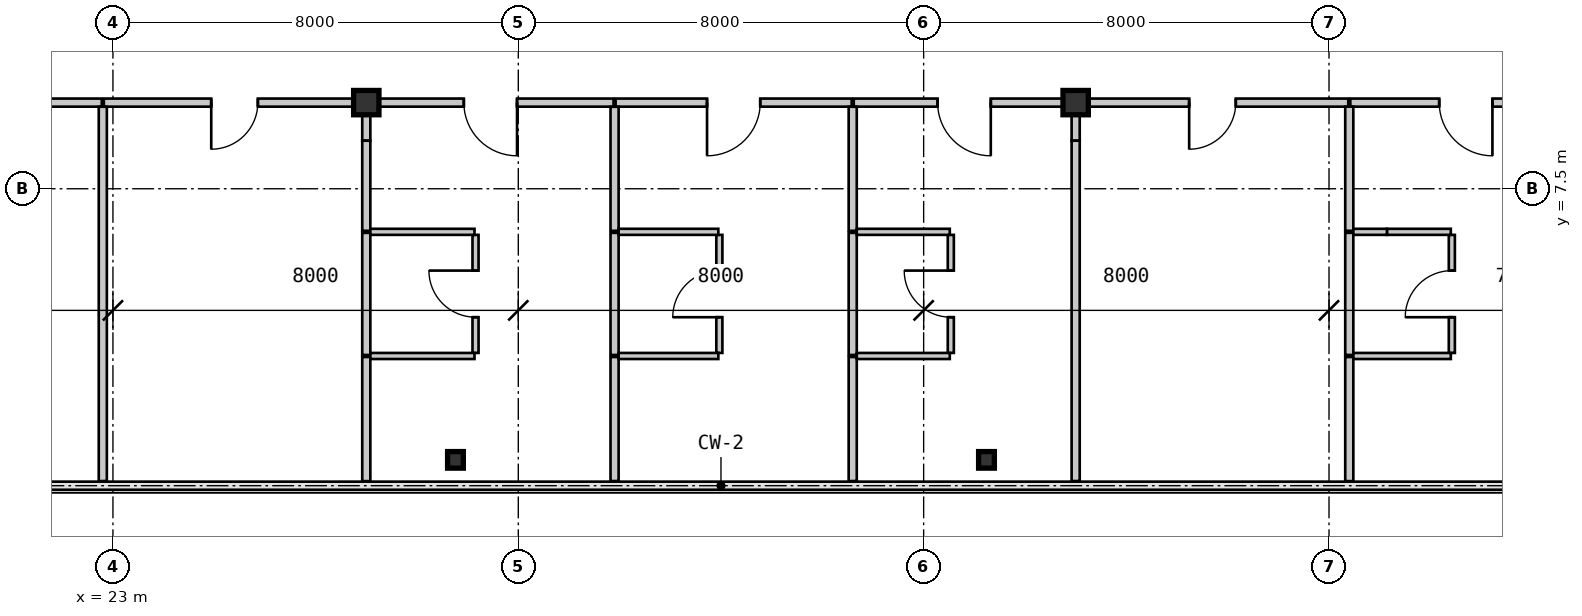
"""IFC4 building model, lengths in metres.
Left out: names, types, materials, properties, quantities, classifications, styles, units other than length and angle.
Written with IfcOpenShell. Run it as: python <this file> out.ifc"""

import sys

from ifc_helpers import new_model, si_unit, direction, frame, frame_2d, origin, origin_2d, place, context, subcontext, project, spatial, rectangle, i_section, extrude, source, transform, mapped, element, fill, save


model = new_model("IFC4")
c1 = context("Model", 3, precision=1e-05, world=origin(), true_north=direction((0.0, 1.0)))
c2 = subcontext(c1, "Body", "Model", "MODEL_VIEW")
j1 = project(units=[si_unit("LENGTHUNIT", "METRE"), si_unit("PLANEANGLEUNIT", "RADIAN")], contexts=[c1])
p1 = place(None, origin())
s1 = spatial("IfcSite", under=j1, at=p1, CompositionType="ELEMENT")
p2 = place(p1, origin())
s2 = spatial("IfcBuilding", under=s1, at=p2, CompositionType="ELEMENT")
p3 = place(p2, frame((0.0, 0.0, 19.95)))
s3 = spatial("IfcBuildingStorey", under=s2, at=p3, CompositionType="ELEMENT", Elevation=19.95)
m1 = source(origin(), c2, "Body", "SweptSolid", [
    extrude(i_section(OverallWidth=0.5, OverallDepth=0.48, WebThickness=0.028, FlangeThickness=0.044, at=origin_2d()), origin(), (0.0, 0.0, 1.0), 3.15),
])
for number, where, z_axis, x_axis in (
    (1, (28.0, 9.2, 0.0), (0.0, 0.0, 1.0), (1.0, 0.0, 0.0)),
    (2, (42.0, 9.2, 0.0), (0.0, 0.0, 1.0), (1.0, 0.0, 0.0)),
):
    element("IfcColumn", number, at=place(p3, frame(where, z_axis=z_axis, x_axis=x_axis)), inside=s3, PredefinedType="COLUMN", context=c2, shape_type="MappedRepresentation", body=[
        mapped(m1, transform((0.0, 0.0, 0.0), scale=1.0)),
    ])
m2 = source(origin(), c2, "Body", "SweptSolid", [
    extrude(i_section(OverallWidth=0.311, OverallDepth=0.327, WebThickness=0.016, FlangeThickness=0.025, at=origin_2d()), origin(), (0.0, 0.0, 1.0), 3.15),
])
for number, where, z_axis, x_axis in (
    (3, (29.76, 2.15, 0.0), (0.0, 0.0, 1.0), (1.0, 0.0, 0.0)),
    (4, (40.24, 2.15, 0.0), (0.0, 0.0, 1.0), (1.0, 0.0, 0.0)),
):
    element("IfcColumn", number, at=place(p3, frame(where, z_axis=z_axis, x_axis=x_axis)), inside=s3, PredefinedType="COLUMN", context=c2, shape_type="MappedRepresentation", body=[
        mapped(m2, transform((0.0, 0.0, 0.0), scale=1.0)),
    ])
m3 = source(origin(), c2, "Body", "SweptSolid", [
    extrude(rectangle(XDim=4.76, YDim=0.16, at=frame_2d((2.38, 0.0))), origin(), (0.0, 0.0, 1.0), 2.93),
])
p4 = place(p3, frame((22.78, 9.2, 0.0), z_axis=(0.0, 0.0, 1.0), x_axis=(-1.0, 0.0, 0.0)))
e5 = element("IfcWall", 5, at=p4, inside=s3, PredefinedType="PARTITIONING", context=c2, shape_type="MappedRepresentation", body=[
    mapped(m3, transform((0.0, 0.0, 0.0), scale=1.0)),
])
m4 = source(origin(), c2, "Body", "SweptSolid", [
    extrude(rectangle(XDim=1.05, YDim=2.1, at=frame_2d((0.525, 1.05))), frame((0.0, 0.09, 0.0), z_axis=(0.0, -1.0, 0.0), x_axis=(1.0, 0.0, 0.0)), (0.0, 0.0, 1.0), 0.18),
])
p5 = place(p4, frame((1.855, 0.0, 0.0)))
e6 = element("IfcOpeningElement", 6, at=p5, cuts=e5, PredefinedType="OPENING", context=c2, shape_type="MappedRepresentation", body=[
    mapped(m4, transform((0.0, 0.0, 0.0), scale=1.0)),
])
m5 = source(origin(), c2, "Body", "SweptSolid", [
    extrude(rectangle(XDim=5.159, YDim=0.16, at=frame_2d((2.58, 0.0))), origin(), (0.0, 0.0, 1.0), 2.93),
])
p6 = place(p3, frame((27.98, 9.2, 0.0), z_axis=(0.0, 0.0, 1.0), x_axis=(-1.0, 0.0, 0.0)))
e7 = element("IfcWall", 7, at=p6, inside=s3, PredefinedType="PARTITIONING", context=c2, shape_type="MappedRepresentation", body=[
    mapped(m5, transform((0.0, 0.0, 0.0), scale=1.0)),
])
m6 = source(origin(), c2, "Body", "SweptSolid", [
    extrude(rectangle(XDim=0.92, YDim=2.1, at=frame_2d((0.46, 1.05))), frame((0.0, 0.09, 0.0), z_axis=(0.0, -1.0, 0.0), x_axis=(1.0, 0.0, 0.0)), (0.0, 0.0, 1.0), 0.18),
])
p7 = place(p6, frame((2.12, 0.0, 0.0)))
e8 = element("IfcOpeningElement", 8, at=p7, cuts=e7, PredefinedType="OPENING", context=c2, shape_type="MappedRepresentation", body=[
    mapped(m6, transform((0.0, 0.0, 0.0), scale=1.0)),
])
m7 = source(origin(), c2, "Body", "SweptSolid", [
    extrude(rectangle(XDim=4.859, YDim=0.16, at=frame_2d((2.43, 0.0))), origin(), (0.0, 0.0, 1.0), 2.328),
])
p8 = place(p3, frame((32.88, 9.2, 0.0), z_axis=(0.0, 0.0, 1.0), x_axis=(-1.0, 0.0, 0.0)))
e9 = element("IfcWall", 9, at=p8, inside=s3, PredefinedType="PARTITIONING", context=c2, shape_type="MappedRepresentation", body=[
    mapped(m7, transform((0.0, 0.0, 0.0), scale=1.0)),
])
p9 = place(p8, frame((1.905, 0.0, 0.0)))
e10 = element("IfcOpeningElement", 10, at=p9, cuts=e9, PredefinedType="OPENING", context=c2, shape_type="MappedRepresentation", body=[
    mapped(m4, transform((0.0, 0.0, 0.0), scale=1.0)),
])
m8 = source(origin(), c2, "Body", "SweptSolid", [
    extrude(rectangle(XDim=4.659, YDim=0.16, at=frame_2d((2.33, 0.0))), origin(), (0.0, 0.0, 1.0), 2.328),
])
p10 = place(p3, frame((37.58, 9.2, 0.0), z_axis=(0.0, 0.0, 1.0), x_axis=(-1.0, 0.0, 0.0)))
e11 = element("IfcWall", 11, at=p10, inside=s3, PredefinedType="PARTITIONING", context=c2, shape_type="MappedRepresentation", body=[
    mapped(m8, transform((0.0, 0.0, 0.0), scale=1.0)),
])
p11 = place(p10, frame((1.805, 0.0, 0.0)))
e12 = element("IfcOpeningElement", 12, at=p11, cuts=e11, PredefinedType="OPENING", context=c2, shape_type="MappedRepresentation", body=[
    mapped(m4, transform((0.0, 0.0, 0.0), scale=1.0)),
])
m9 = source(origin(), c2, "Body", "SweptSolid", [
    extrude(rectangle(XDim=4.359, YDim=0.16, at=frame_2d((2.18, 0.0))), origin(), (0.0, 0.0, 1.0), 2.328),
])
p12 = place(p3, frame((41.98, 9.2, 0.0), z_axis=(0.0, 0.0, 1.0), x_axis=(-1.0, 0.0, 0.0)))
e13 = element("IfcWall", 13, at=p12, inside=s3, PredefinedType="PARTITIONING", context=c2, shape_type="MappedRepresentation", body=[
    mapped(m9, transform((0.0, 0.0, 0.0), scale=1.0)),
])
p13 = place(p12, frame((1.655, 0.0, 0.0)))
e14 = element("IfcOpeningElement", 14, at=p13, cuts=e13, PredefinedType="OPENING", context=c2, shape_type="MappedRepresentation", body=[
    mapped(m4, transform((0.0, 0.0, 0.0), scale=1.0)),
])
m10 = source(origin(), c2, "Body", "SweptSolid", [
    extrude(rectangle(XDim=5.36, YDim=0.16, at=frame_2d((2.68, 0.0))), origin(), (0.0, 0.0, 1.0), 2.93),
])
p14 = place(p3, frame((47.38, 9.2, 0.0), z_axis=(0.0, 0.0, 1.0), x_axis=(-1.0, 0.0, 0.0)))
e15 = element("IfcWall", 15, at=p14, inside=s3, PredefinedType="PARTITIONING", context=c2, shape_type="MappedRepresentation", body=[
    mapped(m10, transform((0.0, 0.0, 0.0), scale=1.0)),
])
p15 = place(p14, frame((2.22, 0.0, 0.0)))
e16 = element("IfcOpeningElement", 16, at=p15, cuts=e15, PredefinedType="OPENING", context=c2, shape_type="MappedRepresentation", body=[
    mapped(m6, transform((0.0, 0.0, 0.0), scale=1.0)),
])
m11 = source(origin(), c2, "Body", "SweptSolid", [
    extrude(rectangle(XDim=4.559, YDim=0.16, at=frame_2d((2.28, 0.0))), origin(), (0.0, 0.0, 1.0), 2.93),
])
p16 = place(p3, frame((51.98, 9.2, 0.0), z_axis=(0.0, 0.0, 1.0), x_axis=(-1.0, 0.0, 0.0)))
e17 = element("IfcWall", 17, at=p16, inside=s3, PredefinedType="PARTITIONING", context=c2, shape_type="MappedRepresentation", body=[
    mapped(m11, transform((0.0, 0.0, 0.0), scale=1.0)),
])
p17 = place(p16, frame((1.755, 0.0, 0.0)))
e18 = element("IfcOpeningElement", 18, at=p17, cuts=e17, PredefinedType="OPENING", context=c2, shape_type="MappedRepresentation", body=[
    mapped(m4, transform((0.0, 0.0, 0.0), scale=1.0)),
])
m12 = source(origin(), c2, "Body", "SweptSolid", [
    extrude(rectangle(XDim=7.386, YDim=0.16, at=frame_2d((3.693, 0.0))), origin(), (0.0, 0.0, 1.0), 2.93),
])
p18 = place(p3, frame((22.8, 9.118, 0.0), z_axis=(0.0, 0.0, 1.0), x_axis=(0.0, -1.0, 0.0)))
e19 = element("IfcWall", 19, at=p18, inside=s3, PredefinedType="PARTITIONING", context=c2, shape_type="MappedRepresentation", body=[
    mapped(m12, transform((0.0, 0.0, 0.0), scale=1.0)),
])
m13 = source(origin(), c2, "Body", "SweptSolid", [
    extrude(rectangle(XDim=2.45, YDim=0.16, at=frame_2d((1.225, 0.0))), origin(), (0.0, 0.0, 1.0), 2.93),
])
p19 = place(p3, frame((28.0, 4.18, 0.0), z_axis=(0.0, 0.0, 1.0), x_axis=(0.0, -1.0, 0.0)))
e20 = element("IfcWall", 20, at=p19, inside=s3, PredefinedType="PARTITIONING", context=c2, shape_type="MappedRepresentation", body=[
    mapped(m13, transform((0.0, 0.0, 0.0), scale=1.0)),
])
m14 = source(origin(), c2, "Body", "SweptSolid", [
    extrude(rectangle(XDim=0.672, YDim=0.16, at=frame_2d((0.336, 0.0))), origin(), (0.0, 0.0, 1.0), 2.397),
])
p20 = place(p3, frame((28.0, 9.12, 0.0), z_axis=(0.0, 0.0, 1.0), x_axis=(0.0, -1.0, 0.0)))
e21 = element("IfcWall", 21, at=p20, inside=s3, PredefinedType="PARTITIONING", context=c2, shape_type="MappedRepresentation", body=[
    mapped(m14, transform((0.0, 0.0, 0.0), scale=1.0)),
])
m15 = source(origin(), c2, "Body", "SweptSolid", [
    extrude(rectangle(XDim=1.778, YDim=0.16, at=frame_2d((0.889, 0.0))), origin(), (0.0, 0.0, 1.0), 2.93),
])
p21 = place(p3, frame((28.0, 8.448, 0.0), z_axis=(0.0, 0.0, 1.0), x_axis=(0.0, -1.0, 0.0)))
e22 = element("IfcWall", 22, at=p21, inside=s3, PredefinedType="PARTITIONING", context=c2, shape_type="MappedRepresentation", body=[
    mapped(m15, transform((0.0, 0.0, 0.0), scale=1.0)),
])
m16 = source(origin(), c2, "Body", "SweptSolid", [
    extrude(rectangle(XDim=2.41, YDim=0.16, at=frame_2d((1.205, 0.0))), origin(), (0.0, 0.0, 1.0), 2.93),
])
p22 = place(p3, frame((28.0, 6.63, 0.0), z_axis=(0.0, 0.0, 1.0), x_axis=(0.0, -1.0, 0.0)))
e23 = element("IfcWall", 23, at=p22, inside=s3, PredefinedType="PARTITIONING", context=c2, shape_type="MappedRepresentation", body=[
    mapped(m16, transform((0.0, 0.0, 0.0), scale=1.0)),
])
m17 = source(origin(), c2, "Body", "SweptSolid", [
    extrude(rectangle(XDim=2.33, YDim=0.12, at=frame_2d((1.165, 0.0))), origin(), (0.0, 0.0, 1.0), 2.93),
])
p23 = place(p3, frame((30.156, 4.26, 0.0), z_axis=(0.0, 0.0, 1.0), x_axis=(0.0, 1.0, 0.0)))
e24 = element("IfcWall", 24, at=p23, inside=s3, PredefinedType="PARTITIONING", context=c2, shape_type="MappedRepresentation", body=[
    mapped(m17, transform((0.0, 0.0, 0.0), scale=1.0)),
])
m18 = source(origin(), c2, "Body", "SweptSolid", [
    extrude(rectangle(XDim=0.92, YDim=2.1, at=frame_2d((0.46, 1.05))), frame((0.0, 0.07, 0.0), z_axis=(0.0, -1.0, 0.0), x_axis=(1.0, 0.0, 0.0)), (0.0, 0.0, 1.0), 0.14),
])
p24 = place(p23, frame((0.705, 0.0, 0.0)))
e25 = element("IfcOpeningElement", 25, at=p24, cuts=e24, PredefinedType="OPENING", context=c2, shape_type="MappedRepresentation", body=[
    mapped(m18, transform((0.0, 0.0, 0.0), scale=1.0)),
])
m19 = source(origin(), c2, "Body", "SweptSolid", [
    extrude(rectangle(XDim=2.056, YDim=0.12, at=frame_2d((1.028, 0.0))), origin(), (0.0, 0.0, 1.0), 2.93),
])
for number, where, z_axis, x_axis in (
    (26, (28.08, 4.2, 0.0), (0.0, 0.0, 1.0), (1.0, 0.0, 0.0)),
    (27, (30.136, 6.65, 0.0), (0.0, 0.0, 1.0), (-1.0, 0.0, 0.0)),
):
    element("IfcWall", number, at=place(p3, frame(where, z_axis=z_axis, x_axis=x_axis)), inside=s3, PredefinedType="PARTITIONING", context=c2, shape_type="MappedRepresentation", body=[
        mapped(m19, transform((0.0, 0.0, 0.0), scale=1.0)),
    ])
m20 = source(origin(), c2, "Body", "SweptSolid", [
    extrude(rectangle(XDim=2.448, YDim=0.16, at=frame_2d((1.224, 0.0))), origin(), (0.0, 0.0, 1.0), 2.93),
])
for number, where, z_axis, x_axis in (
    (28, (32.9, 4.18, 0.0), (0.0, 0.0, 1.0), (0.0, -1.0, 0.0)),
    (29, (32.9, 9.118, 0.0), (0.0, 0.0, 1.0), (0.0, -1.0, 0.0)),
):
    element("IfcWall", number, at=place(p3, frame(where, z_axis=z_axis, x_axis=x_axis)), inside=s3, PredefinedType="PARTITIONING", context=c2, shape_type="MappedRepresentation", body=[
        mapped(m20, transform((0.0, 0.0, 0.0), scale=1.0)),
    ])
p25 = place(p3, frame((32.9, 6.63, 0.0), z_axis=(0.0, 0.0, 1.0), x_axis=(0.0, -1.0, 0.0)))
e30 = element("IfcWall", 30, at=p25, inside=s3, PredefinedType="PARTITIONING", context=c2, shape_type="MappedRepresentation", body=[
    mapped(m16, transform((0.0, 0.0, 0.0), scale=1.0)),
])
p26 = place(p3, frame((34.968, 4.26, 0.0), z_axis=(0.0, 0.0, 1.0), x_axis=(0.0, 1.0, 0.0)))
e31 = element("IfcWall", 31, at=p26, inside=s3, PredefinedType="PARTITIONING", context=c2, shape_type="MappedRepresentation", body=[
    mapped(m17, transform((0.0, 0.0, 0.0), scale=1.0)),
])
p27 = place(p26, frame((0.705, 0.0, 0.0)))
e32 = element("IfcOpeningElement", 32, at=p27, cuts=e31, PredefinedType="OPENING", context=c2, shape_type="MappedRepresentation", body=[
    mapped(m18, transform((0.0, 0.0, 0.0), scale=1.0)),
])
m21 = source(origin(), c2, "Body", "SweptSolid", [
    extrude(rectangle(XDim=1.968, YDim=0.12, at=frame_2d((0.984, 0.0))), origin(), (0.0, 0.0, 1.0), 2.93),
])
for number, where, z_axis, x_axis in (
    (33, (32.98, 4.2, 0.0), (0.0, 0.0, 1.0), (1.0, 0.0, 0.0)),
    (34, (34.948, 6.65, 0.0), (0.0, 0.0, 1.0), (-1.0, 0.0, 0.0)),
):
    element("IfcWall", number, at=place(p3, frame(where, z_axis=z_axis, x_axis=x_axis)), inside=s3, PredefinedType="PARTITIONING", context=c2, shape_type="MappedRepresentation", body=[
        mapped(m21, transform((0.0, 0.0, 0.0), scale=1.0)),
    ])
for number, where, z_axis, x_axis in (
    (35, (37.6, 4.18, 0.0), (0.0, 0.0, 1.0), (0.0, -1.0, 0.0)),
    (36, (37.6, 9.118, 0.0), (0.0, 0.0, 1.0), (0.0, -1.0, 0.0)),
):
    element("IfcWall", number, at=place(p3, frame(where, z_axis=z_axis, x_axis=x_axis)), inside=s3, PredefinedType="PARTITIONING", context=c2, shape_type="MappedRepresentation", body=[
        mapped(m20, transform((0.0, 0.0, 0.0), scale=1.0)),
    ])
p28 = place(p3, frame((37.6, 6.63, 0.0), z_axis=(0.0, 0.0, 1.0), x_axis=(0.0, -1.0, 0.0)))
e37 = element("IfcWall", 37, at=p28, inside=s3, PredefinedType="PARTITIONING", context=c2, shape_type="MappedRepresentation", body=[
    mapped(m16, transform((0.0, 0.0, 0.0), scale=1.0)),
])
p29 = place(p3, frame((39.536, 4.26, 0.0), z_axis=(0.0, 0.0, 1.0), x_axis=(0.0, 1.0, 0.0)))
e38 = element("IfcWall", 38, at=p29, inside=s3, PredefinedType="PARTITIONING", context=c2, shape_type="MappedRepresentation", body=[
    mapped(m17, transform((0.0, 0.0, 0.0), scale=1.0)),
])
p30 = place(p29, frame((0.705, 0.0, 0.0)))
e39 = element("IfcOpeningElement", 39, at=p30, cuts=e38, PredefinedType="OPENING", context=c2, shape_type="MappedRepresentation", body=[
    mapped(m18, transform((0.0, 0.0, 0.0), scale=1.0)),
])
m22 = source(origin(), c2, "Body", "SweptSolid", [
    extrude(rectangle(XDim=1.836, YDim=0.12, at=frame_2d((0.918, 0.0))), origin(), (0.0, 0.0, 1.0), 2.93),
])
for number, where, z_axis, x_axis in (
    (40, (37.68, 4.2, 0.0), (0.0, 0.0, 1.0), (1.0, 0.0, 0.0)),
    (41, (39.516, 6.65, 0.0), (0.0, 0.0, 1.0), (-1.0, 0.0, 0.0)),
):
    element("IfcWall", number, at=place(p3, frame(where, z_axis=z_axis, x_axis=x_axis)), inside=s3, PredefinedType="PARTITIONING", context=c2, shape_type="MappedRepresentation", body=[
        mapped(m22, transform((0.0, 0.0, 0.0), scale=1.0)),
    ])
m23 = source(origin(), c2, "Body", "SweptSolid", [
    extrude(rectangle(XDim=0.67, YDim=0.16, at=frame_2d((0.335, 0.0))), origin(), (0.0, 0.0, 1.0), 2.397),
])
p31 = place(p3, frame((42.0, 9.118, 0.0), z_axis=(0.0, 0.0, 1.0), x_axis=(0.0, -1.0, 0.0)))
e42 = element("IfcWall", 42, at=p31, inside=s3, PredefinedType="PARTITIONING", context=c2, shape_type="MappedRepresentation", body=[
    mapped(m23, transform((0.0, 0.0, 0.0), scale=1.0)),
])
m24 = source(origin(), c2, "Body", "SweptSolid", [
    extrude(rectangle(XDim=6.716, YDim=0.16, at=frame_2d((3.358, 0.0))), origin(), (0.0, 0.0, 1.0), 2.93),
])
p32 = place(p3, frame((42.0, 8.448, 0.0), z_axis=(0.0, 0.0, 1.0), x_axis=(0.0, -1.0, 0.0)))
e43 = element("IfcWall", 43, at=p32, inside=s3, PredefinedType="PARTITIONING", context=c2, shape_type="MappedRepresentation", body=[
    mapped(m24, transform((0.0, 0.0, 0.0), scale=1.0)),
])
p33 = place(p3, frame((47.4, 4.18, 0.0), z_axis=(0.0, 0.0, 1.0), x_axis=(0.0, -1.0, 0.0)))
e44 = element("IfcWall", 44, at=p33, inside=s3, PredefinedType="PARTITIONING", context=c2, shape_type="MappedRepresentation", body=[
    mapped(m13, transform((0.0, 0.0, 0.0), scale=1.0)),
])
m25 = source(origin(), c2, "Body", "SweptSolid", [
    extrude(rectangle(XDim=2.45, YDim=0.16, at=frame_2d((1.225, 0.0))), origin(), (0.0, 0.0, 1.0), 2.93),
])
p34 = place(p3, frame((47.4, 9.12, 0.0), z_axis=(0.0, 0.0, 1.0), x_axis=(0.0, -1.0, 0.0)))
e45 = element("IfcWall", 45, at=p34, inside=s3, PredefinedType="PARTITIONING", context=c2, shape_type="MappedRepresentation", body=[
    mapped(m25, transform((0.0, 0.0, 0.0), scale=1.0)),
])
p35 = place(p3, frame((47.4, 6.63, 0.0), z_axis=(0.0, 0.0, 1.0), x_axis=(0.0, -1.0, 0.0)))
e46 = element("IfcWall", 46, at=p35, inside=s3, PredefinedType="PARTITIONING", context=c2, shape_type="MappedRepresentation", body=[
    mapped(m16, transform((0.0, 0.0, 0.0), scale=1.0)),
])
p36 = place(p3, frame((49.424, 4.26, 0.0), z_axis=(0.0, 0.0, 1.0), x_axis=(0.0, 1.0, 0.0)))
e47 = element("IfcWall", 47, at=p36, inside=s3, PredefinedType="PARTITIONING", context=c2, shape_type="MappedRepresentation", body=[
    mapped(m17, transform((0.0, 0.0, 0.0), scale=1.0)),
])
p37 = place(p36, frame((0.705, 0.0, 0.0)))
e48 = element("IfcOpeningElement", 48, at=p37, cuts=e47, PredefinedType="OPENING", context=c2, shape_type="MappedRepresentation", body=[
    mapped(m18, transform((0.0, 0.0, 0.0), scale=1.0)),
])
m26 = source(origin(), c2, "Body", "SweptSolid", [
    extrude(rectangle(XDim=1.924, YDim=0.12, at=frame_2d((0.962, 0.0))), origin(), (0.0, 0.0, 1.0), 2.93),
])
p38 = place(p3, frame((47.48, 4.2, 0.0), z_axis=(0.0, 0.0, 1.0), x_axis=(1.0, 0.0, 0.0)))
e49 = element("IfcWall", 49, at=p38, inside=s3, PredefinedType="PARTITIONING", context=c2, shape_type="MappedRepresentation", body=[
    mapped(m26, transform((0.0, 0.0, 0.0), scale=1.0)),
])
m27 = source(origin(), c2, "Body", "SweptSolid", [
    extrude(rectangle(XDim=1.26, YDim=0.12, at=frame_2d((0.63, 0.0))), origin(), (0.0, 0.0, 1.0), 2.93),
])
p39 = place(p3, frame((49.404, 6.65, 0.0), z_axis=(0.0, 0.0, 1.0), x_axis=(-1.0, 0.0, 0.0)))
e50 = element("IfcWall", 50, at=p39, inside=s3, PredefinedType="PARTITIONING", context=c2, shape_type="MappedRepresentation", body=[
    mapped(m27, transform((0.0, 0.0, 0.0), scale=1.0)),
])
m28 = source(origin(), c2, "Body", "SweptSolid", [
    extrude(rectangle(XDim=0.664, YDim=0.12, at=frame_2d((0.332, 0.0))), origin(), (0.0, 0.0, 1.0), 2.47),
])
p40 = place(p3, frame((48.144, 6.65, 0.0), z_axis=(0.0, 0.0, 1.0), x_axis=(-1.0, 0.0, 0.0)))
e51 = element("IfcWall", 51, at=p40, inside=s3, PredefinedType="PARTITIONING", context=c2, shape_type="MappedRepresentation", body=[
    mapped(m28, transform((0.0, 0.0, 0.0), scale=1.0)),
])
m29 = source(origin(), c2, "Body", "SweptSolid", [
    extrude(rectangle(XDim=0.92, YDim=2.1, at=frame_2d((0.46, 1.05))), frame((0.0, 0.025, 0.0), z_axis=(0.0, -1.0, 0.0), x_axis=(1.0, 0.0, 0.0)), (0.0, 0.0, 1.0), 0.05),
])
p41 = place(p7, origin())
e52 = element("IfcDoor", 52, at=p41, inside=s3, OperationType="SINGLE_SWING_RIGHT", PredefinedType="DOOR", context=c2, shape_type="MappedRepresentation", body=[
    mapped(m29, transform((0.0, 0.0, 0.0), scale=1.0)),
])
fill(e8, e52)
m30 = source(origin(), c2, "Body", "SweptSolid", [
    extrude(rectangle(XDim=1.05, YDim=2.1, at=frame_2d((0.525, 1.05))), frame((0.0, 0.025, 0.0), z_axis=(0.0, -1.0, 0.0), x_axis=(1.0, 0.0, 0.0)), (0.0, 0.0, 1.0), 0.05),
])
p42 = place(p9, origin())
e53 = element("IfcDoor", 53, at=p42, inside=s3, OperationType="SINGLE_SWING_LEFT", PredefinedType="DOOR", context=c2, shape_type="MappedRepresentation", body=[
    mapped(m30, transform((0.0, 0.0, 0.0), scale=1.0)),
])
fill(e10, e53)
p43 = place(p11, origin())
e54 = element("IfcDoor", 54, at=p43, inside=s3, OperationType="SINGLE_SWING_RIGHT", PredefinedType="DOOR", context=c2, shape_type="MappedRepresentation", body=[
    mapped(m30, transform((0.0, 0.0, 0.0), scale=1.0)),
])
fill(e12, e54)
p44 = place(p13, origin())
e55 = element("IfcDoor", 55, at=p44, inside=s3, OperationType="SINGLE_SWING_LEFT", PredefinedType="DOOR", context=c2, shape_type="MappedRepresentation", body=[
    mapped(m30, transform((0.0, 0.0, 0.0), scale=1.0)),
])
fill(e14, e55)
p45 = place(p15, origin())
e56 = element("IfcDoor", 56, at=p45, inside=s3, OperationType="SINGLE_SWING_RIGHT", PredefinedType="DOOR", context=c2, shape_type="MappedRepresentation", body=[
    mapped(m29, transform((0.0, 0.0, 0.0), scale=1.0)),
])
fill(e16, e56)
p46 = place(p17, origin())
e57 = element("IfcDoor", 57, at=p46, inside=s3, OperationType="SINGLE_SWING_LEFT", PredefinedType="DOOR", context=c2, shape_type="MappedRepresentation", body=[
    mapped(m30, transform((0.0, 0.0, 0.0), scale=1.0)),
])
fill(e18, e57)
p47 = place(p24, origin())
e58 = element("IfcDoor", 58, at=p47, inside=s3, OperationType="SINGLE_SWING_RIGHT", PredefinedType="DOOR", context=c2, shape_type="MappedRepresentation", body=[
    mapped(m29, transform((0.0, 0.0, 0.0), scale=1.0)),
])
fill(e25, e58)
p48 = place(p27, origin())
e59 = element("IfcDoor", 59, at=p48, inside=s3, OperationType="SINGLE_SWING_LEFT", PredefinedType="DOOR", context=c2, shape_type="MappedRepresentation", body=[
    mapped(m29, transform((0.0, 0.0, 0.0), scale=1.0)),
])
fill(e32, e59)
p49 = place(p30, origin())
e60 = element("IfcDoor", 60, at=p49, inside=s3, OperationType="SINGLE_SWING_RIGHT", PredefinedType="DOOR", context=c2, shape_type="MappedRepresentation", body=[
    mapped(m29, transform((0.0, 0.0, 0.0), scale=1.0)),
])
fill(e39, e60)
p50 = place(p37, origin())
e61 = element("IfcDoor", 61, at=p50, inside=s3, OperationType="SINGLE_SWING_LEFT", PredefinedType="DOOR", context=c2, shape_type="MappedRepresentation", body=[
    mapped(m29, transform((0.0, 0.0, 0.0), scale=1.0)),
])
fill(e48, e61)
save(model, sys.argv[1])
